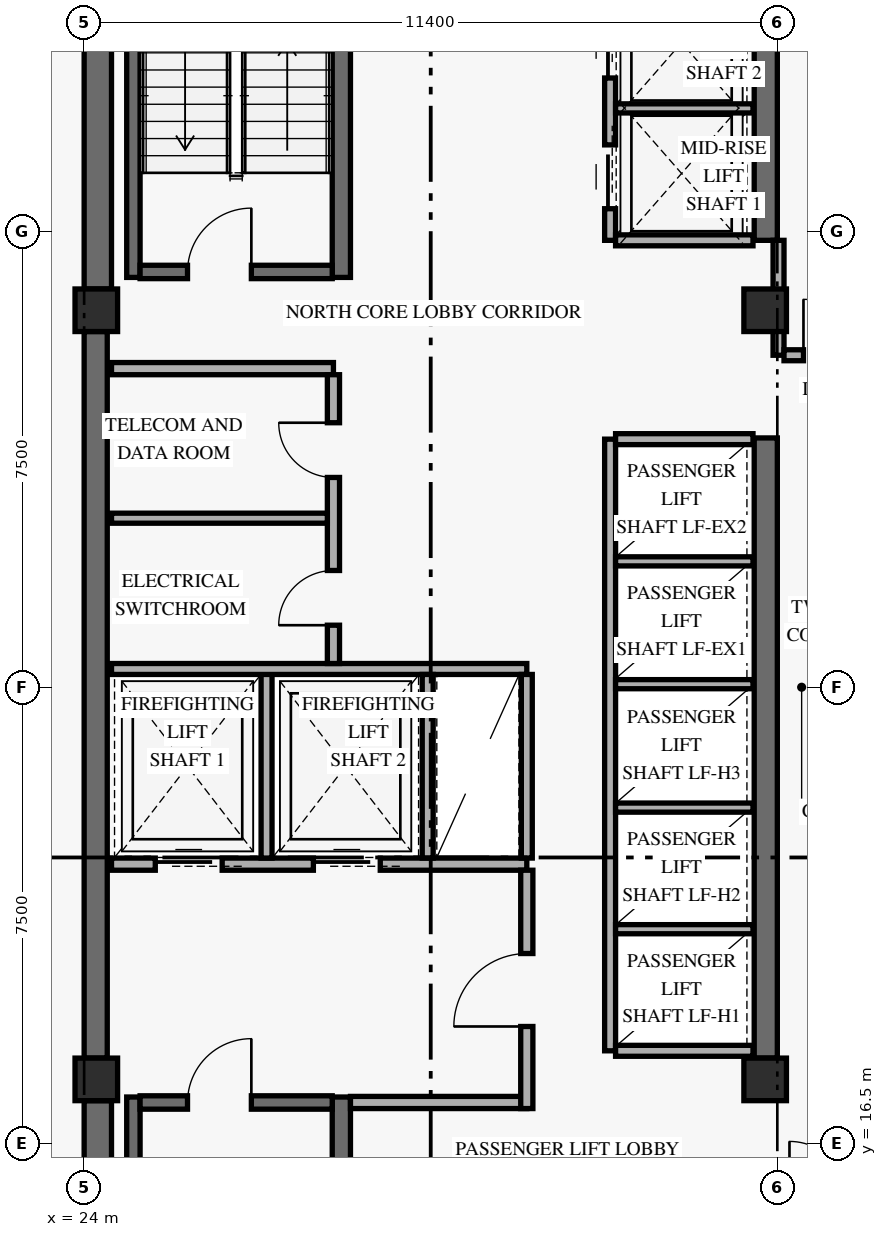
"""IFC4 building model, lengths in metres.
Left out: names, types, materials, properties, quantities, classifications, styles, units other than length and angle.
Written with IfcOpenShell. Run it as: python <this file> out.ifc"""

import sys

from ifc_helpers import new_model, si_unit, direction, frame, frame_2d, origin, origin_2d, place, context, subcontext, project, spatial, rectangle, extrude, element, fill, save


model = new_model("IFC4")
c1 = context("Model", 3, precision=1e-05, world=origin(), true_north=direction((0.0, 1.0)))
c2 = subcontext(c1, "Body", "Model", "MODEL_VIEW")
j1 = project(units=[si_unit("LENGTHUNIT", "METRE"), si_unit("PLANEANGLEUNIT", "RADIAN")], contexts=[c1])
p1 = place(None, origin())
s1 = spatial("IfcSite", under=j1, at=p1, CompositionType="ELEMENT")
p2 = place(p1, origin())
s2 = spatial("IfcBuilding", under=s1, at=p2, CompositionType="ELEMENT")
p3 = place(p2, frame((0.0, 0.0, 148.2)))
s3 = spatial("IfcBuildingStorey", under=s2, at=p3, CompositionType="ELEMENT", Elevation=148.2)
p4 = place(p3, frame((24.225, 9.6, 0.0), z_axis=(0.0, 0.0, 1.0), x_axis=(0.0, 1.0, 0.0)))
e1 = element("IfcWall", 1, at=p4, inside=s3, PredefinedType="SHEAR", context=c2, shape_type="SweptSolid", body=[
    extrude(rectangle(XDim=7.6, YDim=0.45, at=frame_2d((3.8, 0.0))), origin(), (0.0, 0.0, 1.0), 2.748),
])
p5 = place(p3, frame((24.19, 17.9, 0.0), z_axis=(0.0, 0.0, 1.0), x_axis=(0.0, 1.0, 0.0)))
e2 = element("IfcWall", 2, at=p5, inside=s3, PredefinedType="SHEAR", context=c2, shape_type="SweptSolid", body=[
    extrude(rectangle(XDim=11.95, YDim=0.38, at=frame_2d((5.975, 0.0))), origin(), (0.0, 0.0, 1.0), 2.748),
])
p6 = place(p3, frame((24.225, 30.55, 0.0), z_axis=(0.0, 0.0, 1.0), x_axis=(0.0, 1.0, 0.0)))
e3 = element("IfcWall", 3, at=p6, inside=s3, PredefinedType="SHEAR", context=c2, shape_type="SweptSolid", body=[
    extrude(rectangle(XDim=7.85, YDim=0.45, at=frame_2d((3.925, 0.0))), origin(), (0.0, 0.0, 1.0), 2.748),
])
p7 = place(p3, frame((35.21, 17.9, 0.0), z_axis=(0.0, 0.0, 1.0), x_axis=(0.0, 1.0, 0.0)))
e4 = element("IfcWall", 4, at=p7, inside=s3, PredefinedType="SHEAR", context=c2, shape_type="SweptSolid", body=[
    extrude(rectangle(XDim=10.2, YDim=0.38, at=frame_2d((5.1, 0.0))), origin(), (0.0, 0.0, 1.0), 2.748),
])
p8 = place(p3, frame((35.21, 31.35, 0.0), z_axis=(0.0, 0.0, 1.0), x_axis=(0.0, 1.0, 0.0)))
e5 = element("IfcWall", 5, at=p8, inside=s3, PredefinedType="SHEAR", context=c2, shape_type="SweptSolid", body=[
    extrude(rectangle(XDim=7.05, YDim=0.38, at=frame_2d((3.525, 0.0))), origin(), (0.0, 0.0, 1.0), 2.748),
])
p9 = place(p3, frame((24.81, 9.5, 0.0), z_axis=(0.0, 0.0, 1.0), x_axis=(0.0, 1.0, 0.0)))
e6 = element("IfcWall", 6, at=p9, inside=s3, PredefinedType="SHEAR", context=c2, shape_type="SweptSolid", body=[
    extrude(rectangle(XDim=7.76, YDim=0.22, at=frame_2d((3.88, 0.0))), origin(), (0.0, 0.0, 1.0), 3.36),
])
p10 = place(p3, frame((28.23, 9.5, 0.0), z_axis=(0.0, 0.0, 1.0), x_axis=(0.0, 1.0, 0.0)))
e7 = element("IfcWall", 7, at=p10, inside=s3, PredefinedType="SHEAR", context=c2, shape_type="SweptSolid", body=[
    extrude(rectangle(XDim=7.76, YDim=0.3, at=frame_2d((3.88, 0.0))), origin(), (0.0, 0.0, 1.0), 3.36),
])
p11 = place(p3, frame((24.92, 17.17, 0.0), z_axis=(0.0, 0.0, 1.0), x_axis=(1.0, 0.0, 0.0)))
e8 = element("IfcWall", 8, at=p11, inside=s3, PredefinedType="SHEAR", context=c2, shape_type="SweptSolid", body=[
    extrude(rectangle(XDim=3.16, YDim=0.22, at=frame_2d((1.58, 0.0))), origin(), (0.0, 0.0, 1.0), 3.36),
])
p12 = place(p11, frame((0.78, 0.0, 0.0)))
e9 = element("IfcOpeningElement", 9, at=p12, cuts=e8, PredefinedType="OPENING", context=c2, shape_type="SweptSolid", body=[
    extrude(rectangle(XDim=1.05, YDim=2.15, at=frame_2d((0.525, 1.075))), frame((0.0, 0.12, 0.0), z_axis=(0.0, -1.0, 0.0), x_axis=(1.0, 0.0, 0.0)), (0.0, 0.0, 1.0), 0.24),
])
p13 = place(p3, frame((24.81, 30.74, 0.0), z_axis=(0.0, 0.0, 1.0), x_axis=(0.0, 1.0, 0.0)))
e10 = element("IfcWall", 10, at=p13, inside=s3, PredefinedType="SHEAR", context=c2, shape_type="SweptSolid", body=[
    extrude(rectangle(XDim=7.76, YDim=0.22, at=frame_2d((3.88, 0.0))), origin(), (0.0, 0.0, 1.0), 3.36),
])
p14 = place(p3, frame((28.23, 30.74, 0.0), z_axis=(0.0, 0.0, 1.0), x_axis=(0.0, 1.0, 0.0)))
e11 = element("IfcWall", 11, at=p14, inside=s3, PredefinedType="SHEAR", context=c2, shape_type="SweptSolid", body=[
    extrude(rectangle(XDim=7.76, YDim=0.3, at=frame_2d((3.88, 0.0))), origin(), (0.0, 0.0, 1.0), 3.36),
])
p15 = place(p3, frame((24.92, 30.83, 0.0), z_axis=(0.0, 0.0, 1.0), x_axis=(1.0, 0.0, 0.0)))
e12 = element("IfcWall", 12, at=p15, inside=s3, PredefinedType="SHEAR", context=c2, shape_type="SweptSolid", body=[
    extrude(rectangle(XDim=3.16, YDim=0.22, at=frame_2d((1.58, 0.0))), origin(), (0.0, 0.0, 1.0), 3.36),
])
p16 = place(p15, frame((0.78, 0.0, 0.0)))
e13 = element("IfcOpeningElement", 13, at=p16, cuts=e12, PredefinedType="OPENING", context=c2, shape_type="SweptSolid", body=[
    extrude(rectangle(XDim=1.05, YDim=2.15, at=frame_2d((0.525, 1.075))), frame((0.0, 0.12, 0.0), z_axis=(0.0, -1.0, 0.0), x_axis=(1.0, 0.0, 0.0)), (0.0, 0.0, 1.0), 0.24),
])
for number, where, z_axis, x_axis in (
    (14, (24.2, 17.55, 0.0), (0.0, 0.0, 1.0), (1.0, 0.0, 0.0)),
    (15, (24.2, 30.2, 0.0), (0.0, 0.0, 1.0), (1.0, 0.0, 0.0)),
    (16, (35.2, 17.55, 0.0), (0.0, 0.0, 1.0), (1.0, 0.0, 0.0)),
    (17, (35.2, 30.2, 0.0), (0.0, 0.0, 1.0), (1.0, 0.0, 0.0)),
):
    element("IfcColumn", number, at=place(p3, frame(where, z_axis=z_axis, x_axis=x_axis)), inside=s3, PredefinedType="COLUMN", context=c2, shape_type="SweptSolid", body=[
        extrude(rectangle(XDim=0.7, YDim=0.7, at=origin_2d()), origin(), (0.0, 0.0, 1.0), 3.6),
    ])
p17 = place(p3, frame((24.45, 21.09, 0.0), z_axis=(0.0, 0.0, 1.0), x_axis=(1.0, 0.0, 0.0)))
e18 = element("IfcWall", 18, at=p17, inside=s3, PredefinedType="STANDARD", context=c2, shape_type="SweptSolid", body=[
    extrude(rectangle(XDim=6.83, YDim=0.2, at=frame_2d((3.415, 0.0))), origin(), (0.0, 0.0, 1.0), 3.36),
])
p18 = place(p17, frame((0.72, 0.0, 0.0)))
e19 = element("IfcOpeningElement", 19, at=p18, cuts=e18, PredefinedType="OPENING", context=c2, shape_type="SweptSolid", body=[
    extrude(rectangle(XDim=1.1, YDim=2.2, at=frame_2d((0.55, 1.1))), frame((0.0, 0.11, 0.0), z_axis=(0.0, -1.0, 0.0), x_axis=(1.0, 0.0, 0.0)), (0.0, 0.0, 1.0), 0.22),
])
p19 = place(p17, frame((3.32, 0.0, 0.0)))
e20 = element("IfcOpeningElement", 20, at=p19, cuts=e18, PredefinedType="OPENING", context=c2, shape_type="SweptSolid", body=[
    extrude(rectangle(XDim=1.1, YDim=2.2, at=frame_2d((0.55, 1.1))), frame((0.0, 0.11, 0.0), z_axis=(0.0, -1.0, 0.0), x_axis=(1.0, 0.0, 0.0)), (0.0, 0.0, 1.0), 0.22),
])
p20 = place(p3, frame((28.38, 17.17, 0.0), z_axis=(0.0, 0.0, 1.0), x_axis=(1.0, 0.0, 0.0)))
e21 = element("IfcWall", 21, at=p20, inside=s3, PredefinedType="STANDARD", context=c2, shape_type="SweptSolid", body=[
    extrude(rectangle(XDim=2.9, YDim=0.2, at=frame_2d((1.45, 0.0))), origin(), (0.0, 0.0, 1.0), 3.36),
])
p21 = place(p3, frame((31.28, 17.07, 0.0), z_axis=(0.0, 0.0, 1.0), x_axis=(0.0, 1.0, 0.0)))
e22 = element("IfcWall", 22, at=p21, inside=s3, PredefinedType="STANDARD", context=c2, shape_type="SweptSolid", body=[
    extrude(rectangle(XDim=3.92, YDim=0.2, at=frame_2d((1.96, 0.0))), origin(), (0.0, 0.0, 1.0), 2.73),
])
p22 = place(p21, frame((1.35, 0.0, 0.0)))
e23 = element("IfcOpeningElement", 23, at=p22, cuts=e22, PredefinedType="OPENING", context=c2, shape_type="SweptSolid", body=[
    extrude(rectangle(XDim=1.2, YDim=2.15, at=frame_2d((0.6, 1.075))), frame((0.0, 0.11, 0.0), z_axis=(0.0, -1.0, 0.0), x_axis=(1.0, 0.0, 0.0)), (0.0, 0.0, 1.0), 0.22),
])
p23 = place(p3, frame((27.0, 21.19, 0.0), z_axis=(0.0, 0.0, 1.0), x_axis=(0.0, 1.0, 0.0)))
e24 = element("IfcWall", 24, at=p23, inside=s3, PredefinedType="STANDARD", context=c2, shape_type="SweptSolid", body=[
    extrude(rectangle(XDim=3.11, YDim=0.18, at=frame_2d((1.555, 0.0))), origin(), (0.0, 0.0, 1.0), 3.36),
])
p24 = place(p3, frame((24.45, 24.3, 0.0), z_axis=(0.0, 0.0, 1.0), x_axis=(1.0, 0.0, 0.0)))
e25 = element("IfcWall", 25, at=p24, inside=s3, PredefinedType="STANDARD", context=c2, shape_type="SweptSolid", body=[
    extrude(rectangle(XDim=6.83, YDim=0.18, at=frame_2d((3.415, 0.0))), origin(), (0.0, 0.0, 1.0), 3.36),
])
for number, where, z_axis, x_axis in (
    (26, (29.65, 21.19, 0.0), (0.0, 0.0, 1.0), (0.0, 1.0, 0.0)),
    (27, (31.28, 21.19, 0.0), (0.0, 0.0, 1.0), (0.0, 1.0, 0.0)),
):
    element("IfcWall", number, at=place(p3, frame(where, z_axis=z_axis, x_axis=x_axis)), inside=s3, PredefinedType="STANDARD", context=c2, shape_type="SweptSolid", body=[
        extrude(rectangle(XDim=3.02, YDim=0.18, at=frame_2d((1.51, 0.0))), origin(), (0.0, 0.0, 1.0), 3.36),
    ])
p25 = place(p3, frame((24.45, 29.24, 0.0), z_axis=(0.0, 0.0, 1.0), x_axis=(1.0, 0.0, 0.0)))
e28 = element("IfcWall", 28, at=p25, inside=s3, PredefinedType="STANDARD", context=c2, shape_type="SweptSolid", body=[
    extrude(rectangle(XDim=3.65, YDim=0.2, at=frame_2d((1.825, 0.0))), origin(), (0.0, 0.0, 1.0), 3.36),
])
p26 = place(p3, frame((28.1, 24.39, 0.0), z_axis=(0.0, 0.0, 1.0), x_axis=(0.0, 1.0, 0.0)))
e29 = element("IfcWall", 29, at=p26, inside=s3, PredefinedType="STANDARD", context=c2, shape_type="SweptSolid", body=[
    extrude(rectangle(XDim=4.75, YDim=0.2, at=frame_2d((2.375, 0.0))), origin(), (0.0, 0.0, 1.0), 3.36),
])
p27 = place(p26, frame((0.63, 0.0, 0.0)))
e30 = element("IfcOpeningElement", 30, at=p27, cuts=e29, PredefinedType="OPENING", context=c2, shape_type="SweptSolid", body=[
    extrude(rectangle(XDim=0.9, YDim=2.1, at=frame_2d((0.45, 1.05))), frame((0.0, 0.11, 0.0), z_axis=(0.0, -1.0, 0.0), x_axis=(1.0, 0.0, 0.0)), (0.0, 0.0, 1.0), 0.22),
])
p28 = place(p26, frame((3.06, 0.0, 0.0)))
e31 = element("IfcOpeningElement", 31, at=p28, cuts=e29, PredefinedType="OPENING", context=c2, shape_type="SweptSolid", body=[
    extrude(rectangle(XDim=0.9, YDim=2.1, at=frame_2d((0.45, 1.05))), frame((0.0, 0.11, 0.0), z_axis=(0.0, -1.0, 0.0), x_axis=(1.0, 0.0, 0.0)), (0.0, 0.0, 1.0), 0.22),
])
p29 = place(p3, frame((24.45, 26.78, 0.0), z_axis=(0.0, 0.0, 1.0), x_axis=(1.0, 0.0, 0.0)))
e32 = element("IfcWall", 32, at=p29, inside=s3, PredefinedType="PARTITIONING", context=c2, shape_type="SweptSolid", body=[
    extrude(rectangle(XDim=3.55, YDim=0.165, at=frame_2d((1.775, 0.0))), origin(), (0.0, 0.0, 1.0), 3.36),
])
p30 = place(p3, frame((32.65, 18.02, 0.0), z_axis=(0.0, 0.0, 1.0), x_axis=(0.0, 1.0, 0.0)))
e33 = element("IfcWall", 33, at=p30, inside=s3, PredefinedType="STANDARD", context=c2, shape_type="SweptSolid", body=[
    extrude(rectangle(XDim=10.06, YDim=0.18, at=frame_2d((5.03, 0.0))), origin(), (0.0, 0.0, 1.0), 3.36),
])
for number, where, z_axis, x_axis in (
    (34, (32.74, 18.02, 0.0), (0.0, 0.0, 1.0), (1.0, 0.0, 0.0)),
    (35, (32.74, 28.08, 0.0), (0.0, 0.0, 1.0), (1.0, 0.0, 0.0)),
):
    element("IfcWall", number, at=place(p3, frame(where, z_axis=z_axis, x_axis=x_axis)), inside=s3, PredefinedType="STANDARD", context=c2, shape_type="SweptSolid", body=[
        extrude(rectangle(XDim=2.26, YDim=0.18, at=frame_2d((1.13, 0.0))), origin(), (0.0, 0.0, 1.0), 3.36),
    ])
for number, where, z_axis, x_axis in (
    (36, (32.74, 20.02, 0.0), (0.0, 0.0, 1.0), (1.0, 0.0, 0.0)),
    (37, (32.74, 22.02, 0.0), (0.0, 0.0, 1.0), (1.0, 0.0, 0.0)),
    (38, (32.74, 24.05, 0.0), (0.0, 0.0, 1.0), (1.0, 0.0, 0.0)),
    (39, (32.74, 26.07, 0.0), (0.0, 0.0, 1.0), (1.0, 0.0, 0.0)),
):
    element("IfcWall", number, at=place(p3, frame(where, z_axis=z_axis, x_axis=x_axis)), inside=s3, PredefinedType="STANDARD", context=c2, shape_type="SweptSolid", body=[
        extrude(rectangle(XDim=2.26, YDim=0.15, at=frame_2d((1.13, 0.0))), origin(), (0.0, 0.0, 1.0), 3.36),
    ])
p31 = place(p3, frame((32.65, 31.35, 0.0), z_axis=(0.0, 0.0, 1.0), x_axis=(0.0, 1.0, 0.0)))
e40 = element("IfcWall", 40, at=p31, inside=s3, PredefinedType="STANDARD", context=c2, shape_type="SweptSolid", body=[
    extrude(rectangle(XDim=7.21, YDim=0.18, at=frame_2d((3.605, 0.0))), origin(), (0.0, 0.0, 1.0), 3.36),
])
p32 = place(p31, frame((0.52, 0.0, 0.0)))
e41 = element("IfcOpeningElement", 41, at=p32, cuts=e40, PredefinedType="OPENING", context=c2, shape_type="SweptSolid", body=[
    extrude(rectangle(XDim=1.05, YDim=2.2, at=frame_2d((0.525, 1.1))), frame((0.0, 0.1, 0.0), z_axis=(0.0, -1.0, 0.0), x_axis=(1.0, 0.0, 0.0)), (0.0, 0.0, 1.0), 0.2),
])
p33 = place(p31, frame((2.67, 0.0, 0.0)))
e42 = element("IfcOpeningElement", 42, at=p33, cuts=e40, PredefinedType="OPENING", context=c2, shape_type="SweptSolid", body=[
    extrude(rectangle(XDim=1.05, YDim=2.2, at=frame_2d((0.525, 1.1))), frame((0.0, 0.1, 0.0), z_axis=(0.0, -1.0, 0.0), x_axis=(1.0, 0.0, 0.0)), (0.0, 0.0, 1.0), 0.2),
])
p34 = place(p31, frame((4.82, 0.0, 0.0)))
e43 = element("IfcOpeningElement", 43, at=p34, cuts=e40, PredefinedType="OPENING", context=c2, shape_type="SweptSolid", body=[
    extrude(rectangle(XDim=1.05, YDim=2.2, at=frame_2d((0.525, 1.1))), frame((0.0, 0.1, 0.0), z_axis=(0.0, -1.0, 0.0), x_axis=(1.0, 0.0, 0.0)), (0.0, 0.0, 1.0), 0.2),
])
p35 = place(p3, frame((32.74, 31.35, 0.0), z_axis=(0.0, 0.0, 1.0), x_axis=(1.0, 0.0, 0.0)))
e44 = element("IfcWall", 44, at=p35, inside=s3, PredefinedType="STANDARD", context=c2, shape_type="SweptSolid", body=[
    extrude(rectangle(XDim=2.26, YDim=0.18, at=frame_2d((1.13, 0.0))), origin(), (0.0, 0.0, 1.0), 3.36),
])
p36 = place(p3, frame((32.74, 33.52, 0.0), z_axis=(0.0, 0.0, 1.0), x_axis=(1.0, 0.0, 0.0)))
e45 = element("IfcWall", 45, at=p36, inside=s3, PredefinedType="STANDARD", context=c2, shape_type="SweptSolid", body=[
    extrude(rectangle(XDim=2.26, YDim=0.15, at=frame_2d((1.13, 0.0))), origin(), (0.0, 0.0, 1.0), 3.36),
])
p37 = place(p3, frame((35.42, 29.46, 0.0), z_axis=(0.0, 0.0, 1.0), x_axis=(0.0, 1.0, 0.0)))
e46 = element("IfcWall", 46, at=p37, inside=s3, PredefinedType="STANDARD", context=c2, shape_type="SweptSolid", body=[
    extrude(rectangle(XDim=1.89, YDim=0.18, at=frame_2d((0.945, 0.0))), origin(), (0.0, 0.0, 1.0), 2.73),
])
p38 = place(p3, frame((35.51, 29.46, 0.0), z_axis=(0.0, 0.0, 1.0), x_axis=(1.0, 0.0, 0.0)))
e47 = element("IfcWall", 47, at=p38, inside=s3, PredefinedType="STANDARD", context=c2, shape_type="SweptSolid", body=[
    extrude(rectangle(XDim=12.49, YDim=0.18, at=frame_2d((6.245, 0.0))), origin(), (0.0, 0.0, 1.0), 2.73),
])
p39 = place(p38, frame((0.32, 0.0, 0.0)))
e48 = element("IfcOpeningElement", 48, at=p39, cuts=e47, PredefinedType="OPENING", context=c2, shape_type="SweptSolid", body=[
    extrude(rectangle(XDim=0.92, YDim=2.15, at=frame_2d((0.46, 1.075))), frame((0.0, 0.1, 0.0), z_axis=(0.0, -1.0, 0.0), x_axis=(1.0, 0.0, 0.0)), (0.0, 0.0, 1.0), 0.2),
])
p40 = place(p12, frame((1.05, 0.0, 0.0), z_axis=(0.0, 0.0, 1.0), x_axis=(-1.0, 0.0, 0.0)))
e49 = element("IfcDoor", 49, at=p40, inside=s3, OperationType="SINGLE_SWING_LEFT", PredefinedType="DOOR", context=c2, shape_type="SweptSolid", body=[
    extrude(rectangle(XDim=1.05, YDim=2.15, at=frame_2d((0.525, 1.075))), frame((0.0, 0.025, 0.0), z_axis=(0.0, -1.0, 0.0), x_axis=(1.0, 0.0, 0.0)), (0.0, 0.0, 1.0), 0.05),
])
fill(e9, e49)
p41 = place(p16, origin())
e50 = element("IfcDoor", 50, at=p41, inside=s3, OperationType="SINGLE_SWING_RIGHT", PredefinedType="DOOR", context=c2, shape_type="SweptSolid", body=[
    extrude(rectangle(XDim=1.05, YDim=2.15, at=frame_2d((0.525, 1.075))), frame((0.0, 0.025, 0.0), z_axis=(0.0, -1.0, 0.0), x_axis=(1.0, 0.0, 0.0)), (0.0, 0.0, 1.0), 0.05),
])
fill(e13, e50)
p42 = place(p18, origin())
e51 = element("IfcDoor", 51, at=p42, inside=s3, OperationType="SLIDING_TO_LEFT", PredefinedType="DOOR", context=c2, shape_type="SweptSolid", body=[
    extrude(rectangle(XDim=1.1, YDim=2.2, at=frame_2d((0.55, 1.1))), frame((0.0, 0.025, 0.0), z_axis=(0.0, -1.0, 0.0), x_axis=(1.0, 0.0, 0.0)), (0.0, 0.0, 1.0), 0.05),
])
fill(e19, e51)
p43 = place(p19, origin())
e52 = element("IfcDoor", 52, at=p43, inside=s3, OperationType="SLIDING_TO_LEFT", PredefinedType="DOOR", context=c2, shape_type="SweptSolid", body=[
    extrude(rectangle(XDim=1.1, YDim=2.2, at=frame_2d((0.55, 1.1))), frame((0.0, 0.025, 0.0), z_axis=(0.0, -1.0, 0.0), x_axis=(1.0, 0.0, 0.0)), (0.0, 0.0, 1.0), 0.05),
])
fill(e20, e52)
p44 = place(p22, origin())
e53 = element("IfcDoor", 53, at=p44, inside=s3, OperationType="SINGLE_SWING_LEFT", PredefinedType="DOOR", context=c2, shape_type="SweptSolid", body=[
    extrude(rectangle(XDim=1.2, YDim=2.15, at=frame_2d((0.6, 1.075))), frame((0.0, 0.025, 0.0), z_axis=(0.0, -1.0, 0.0), x_axis=(1.0, 0.0, 0.0)), (0.0, 0.0, 1.0), 0.05),
])
fill(e23, e53)
p45 = place(p27, origin())
e54 = element("IfcDoor", 54, at=p45, inside=s3, OperationType="SINGLE_SWING_LEFT", PredefinedType="DOOR", context=c2, shape_type="SweptSolid", body=[
    extrude(rectangle(XDim=0.9, YDim=2.1, at=frame_2d((0.45, 1.05))), frame((0.0, 0.025, 0.0), z_axis=(0.0, -1.0, 0.0), x_axis=(1.0, 0.0, 0.0)), (0.0, 0.0, 1.0), 0.05),
])
fill(e30, e54)
p46 = place(p28, origin())
e55 = element("IfcDoor", 55, at=p46, inside=s3, OperationType="SINGLE_SWING_RIGHT", PredefinedType="DOOR", context=c2, shape_type="SweptSolid", body=[
    extrude(rectangle(XDim=0.9, YDim=2.1, at=frame_2d((0.45, 1.05))), frame((0.0, 0.025, 0.0), z_axis=(0.0, -1.0, 0.0), x_axis=(1.0, 0.0, 0.0)), (0.0, 0.0, 1.0), 0.05),
])
fill(e31, e55)
p47 = place(p32, origin())
e56 = element("IfcDoor", 56, at=p47, inside=s3, OperationType="SLIDING_TO_LEFT", PredefinedType="DOOR", context=c2, shape_type="SweptSolid", body=[
    extrude(rectangle(XDim=1.05, YDim=2.2, at=frame_2d((0.525, 1.1))), frame((0.0, 0.025, 0.0), z_axis=(0.0, -1.0, 0.0), x_axis=(1.0, 0.0, 0.0)), (0.0, 0.0, 1.0), 0.05),
])
fill(e41, e56)
p48 = place(p33, origin())
e57 = element("IfcDoor", 57, at=p48, inside=s3, OperationType="SLIDING_TO_LEFT", PredefinedType="DOOR", context=c2, shape_type="SweptSolid", body=[
    extrude(rectangle(XDim=1.05, YDim=2.2, at=frame_2d((0.525, 1.1))), frame((0.0, 0.025, 0.0), z_axis=(0.0, -1.0, 0.0), x_axis=(1.0, 0.0, 0.0)), (0.0, 0.0, 1.0), 0.05),
])
fill(e42, e57)
p49 = place(p39, origin())
e58 = element("IfcDoor", 58, at=p49, inside=s3, OperationType="SINGLE_SWING_LEFT", PredefinedType="DOOR", context=c2, shape_type="SweptSolid", body=[
    extrude(rectangle(XDim=0.92, YDim=2.15, at=frame_2d((0.46, 1.075))), frame((0.0, 0.025, 0.0), z_axis=(0.0, -1.0, 0.0), x_axis=(1.0, 0.0, 0.0)), (0.0, 0.0, 1.0), 0.05),
])
fill(e48, e58)
save(model, sys.argv[1])
